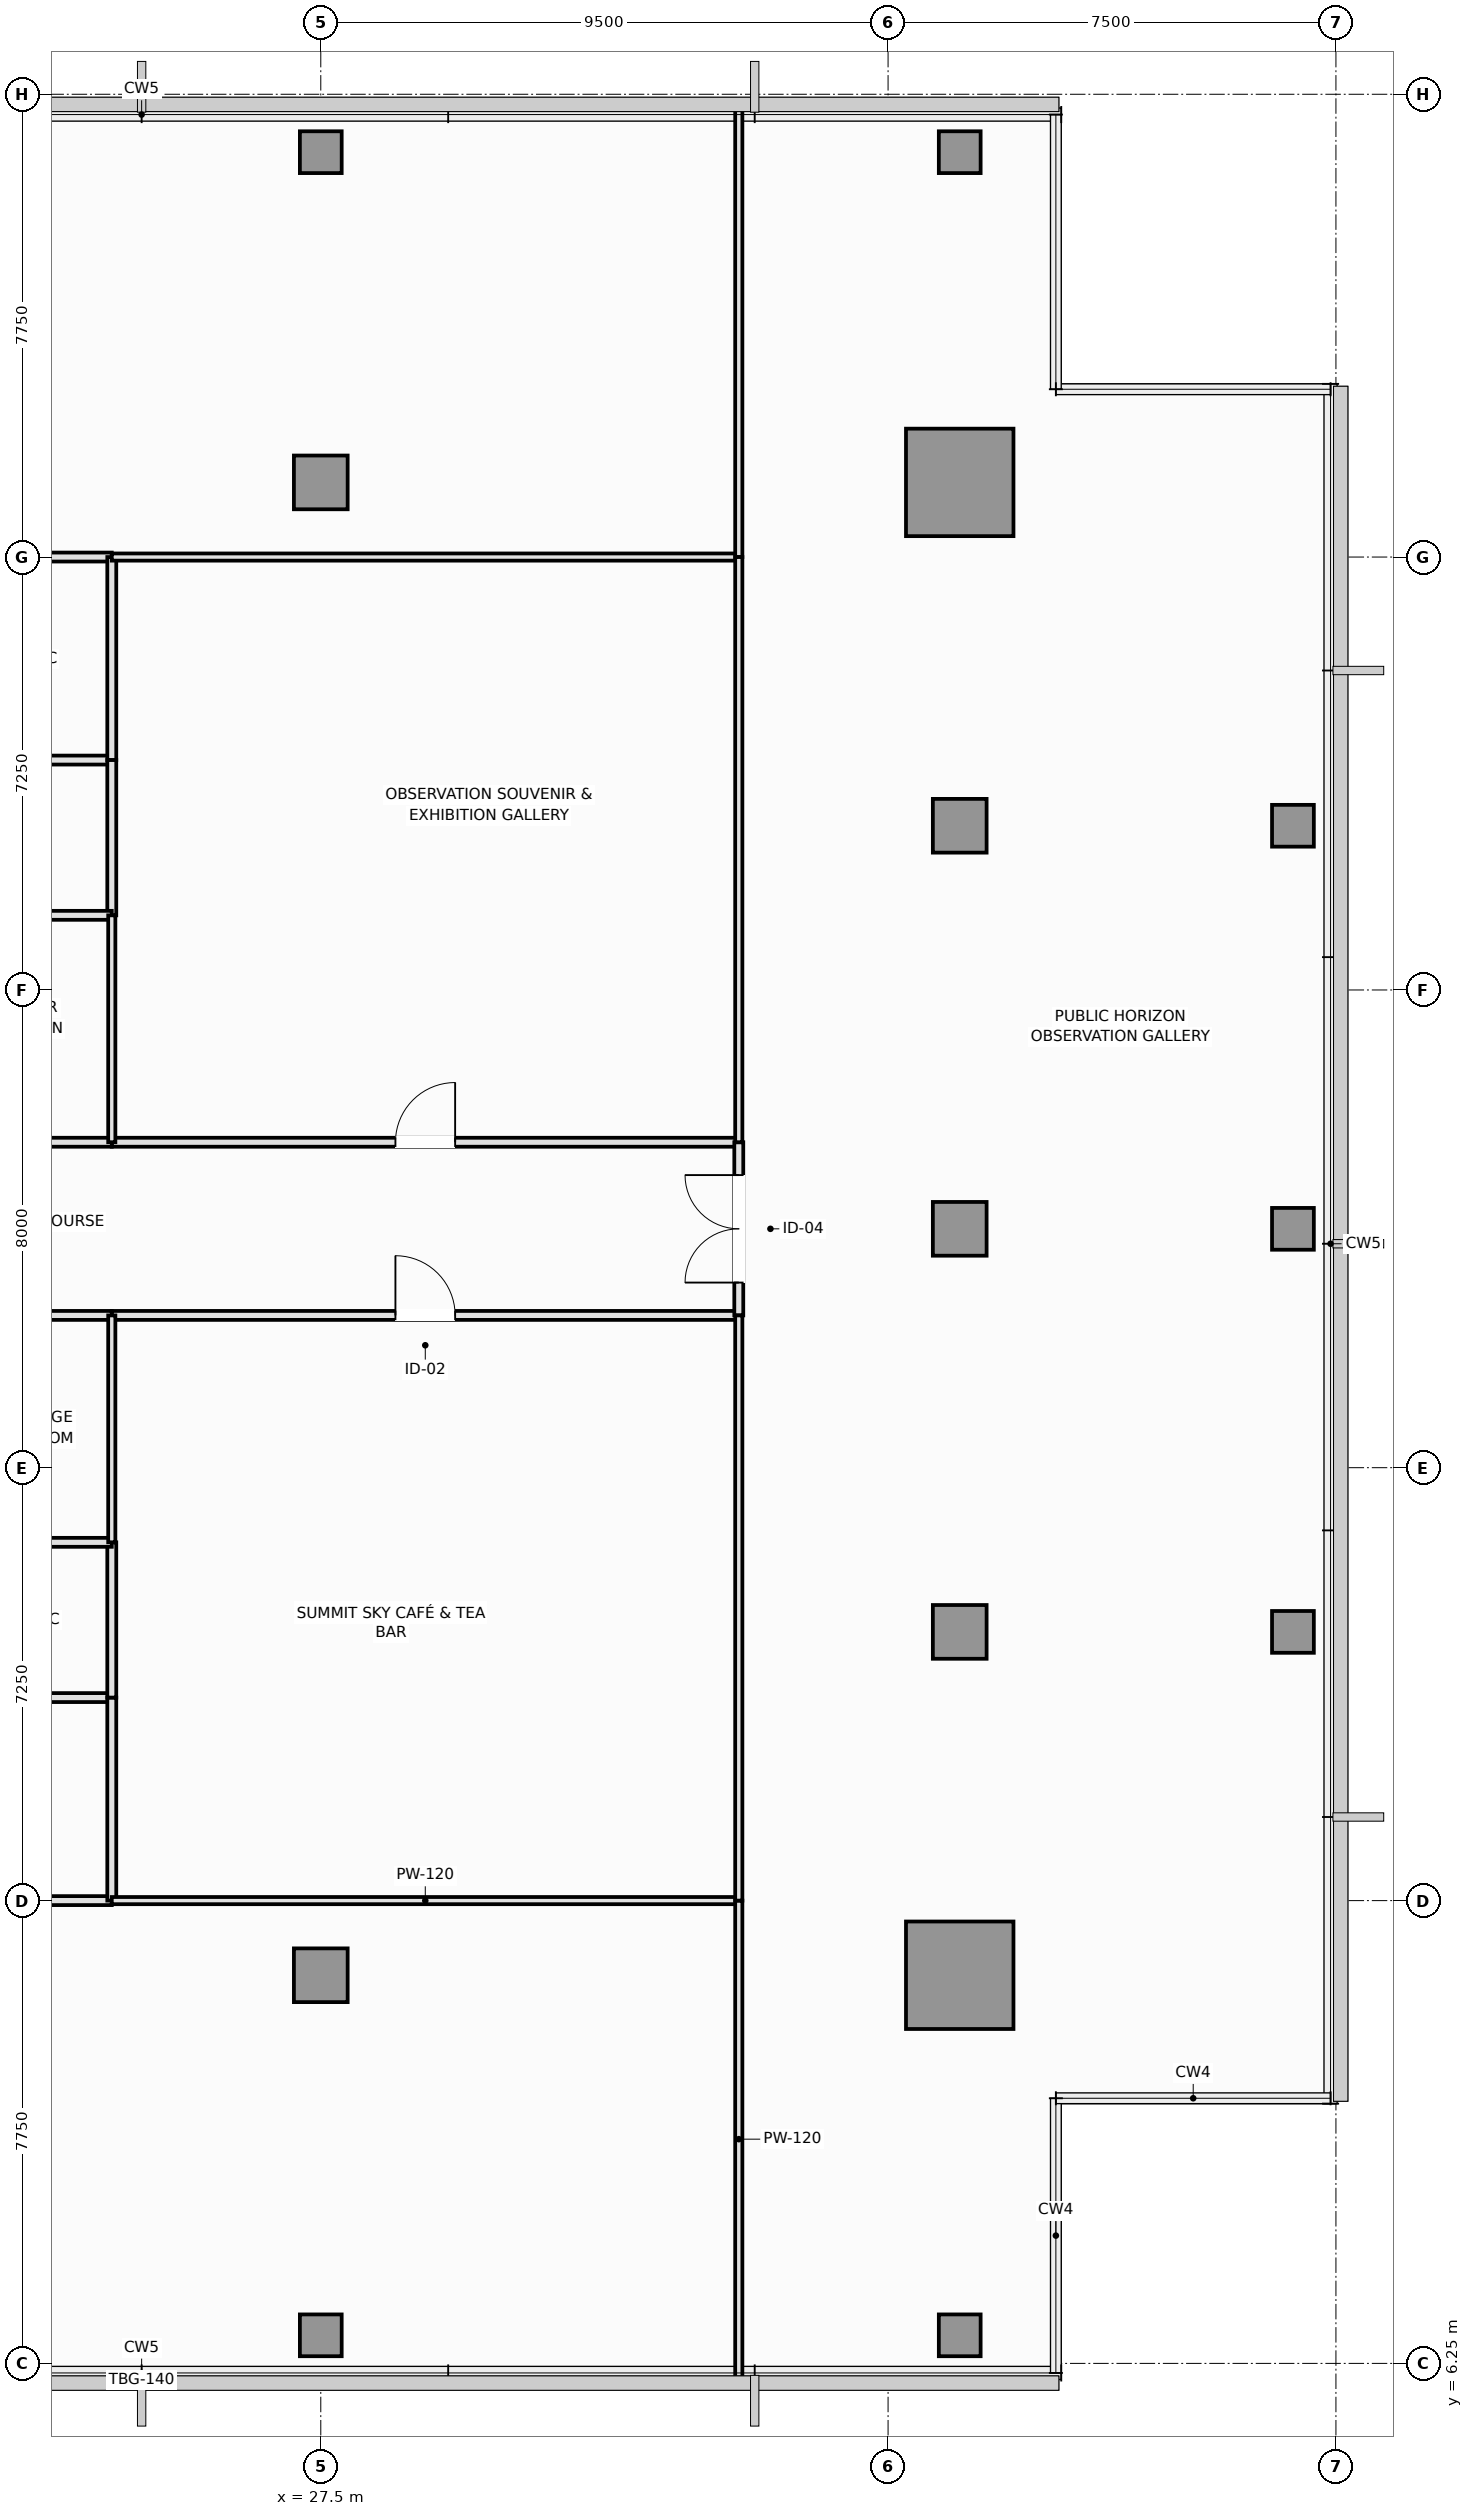
"""IFC4 building model, lengths in metres.
Left out: names, types, materials, properties, quantities, classifications, styles, units other than length and angle.
Written with IfcOpenShell. Run it as: python <this file> out.ifc"""

import sys

from ifc_helpers import new_model, si_unit, direction, frame, frame_2d, origin, origin_2d, place, context, subcontext, project, spatial, rectangle, extrude, element, fill, save


model = new_model("IFC4")
c1 = context("Model", 3, precision=1e-05, world=origin(), true_north=direction((0.0, 1.0)))
c2 = subcontext(c1, "Body", "Model", "MODEL_VIEW")
j1 = project(units=[si_unit("LENGTHUNIT", "METRE"), si_unit("PLANEANGLEUNIT", "RADIAN")], contexts=[c1])
p1 = place(None, origin())
s1 = spatial("IfcSite", under=j1, at=p1, CompositionType="ELEMENT")
p2 = place(p1, origin())
s2 = spatial("IfcBuilding", under=s1, at=p2, CompositionType="ELEMENT")
p3 = place(p2, frame((0.0, 0.0, 291.85)))
s3 = spatial("IfcBuildingStorey", under=s2, at=p3, CompositionType="ELEMENT", Elevation=291.85)
for number, where, z_axis, x_axis in (
    (1, (38.2, 12.75, 0.0), (0.0, 0.0, 1.0), (1.0, 0.0, 0.0)),
    (2, (38.2, 37.75, 0.0), (0.0, 0.0, 1.0), (1.0, 0.0, 0.0)),
):
    element("IfcColumn", number, at=place(p3, frame(where, z_axis=z_axis, x_axis=x_axis)), inside=s3, PredefinedType="COLUMN", context=c2, shape_type="SweptSolid", body=[
        extrude(rectangle(XDim=1.8, YDim=1.8, at=origin_2d()), origin(), (0.0, 0.0, 1.0), 4.8),
    ])
for number, where, z_axis, x_axis in (
    (3, (27.5, 12.75, 0.0), (0.0, 0.0, 1.0), (1.0, 0.0, 0.0)),
    (4, (27.5, 37.75, 0.0), (0.0, 0.0, 1.0), (1.0, 0.0, 0.0)),
    (5, (38.2, 18.5, 0.0), (0.0, 0.0, 1.0), (1.0, 0.0, 0.0)),
    (6, (38.2, 25.25, 0.0), (0.0, 0.0, 1.0), (1.0, 0.0, 0.0)),
    (7, (38.2, 32.0, 0.0), (0.0, 0.0, 1.0), (1.0, 0.0, 0.0)),
):
    element("IfcColumn", number, at=place(p3, frame(where, z_axis=z_axis, x_axis=x_axis)), inside=s3, PredefinedType="COLUMN", context=c2, shape_type="SweptSolid", body=[
        extrude(rectangle(XDim=0.9, YDim=0.9, at=origin_2d()), origin(), (0.0, 0.0, 1.0), 4.8),
    ])
for number, where, z_axis, x_axis in (
    (8, (43.78, 18.5, 0.0), (0.0, 0.0, 1.0), (1.0, 0.0, 0.0)),
    (9, (43.78, 25.25, 0.0), (0.0, 0.0, 1.0), (1.0, 0.0, 0.0)),
    (10, (43.78, 32.0, 0.0), (0.0, 0.0, 1.0), (1.0, 0.0, 0.0)),
    (11, (27.5, 6.72, 0.0), (0.0, 0.0, 1.0), (1.0, 0.0, 0.0)),
    (12, (38.2, 6.72, 0.0), (0.0, 0.0, 1.0), (1.0, 0.0, 0.0)),
    (13, (27.5, 43.28, 0.0), (0.0, 0.0, 1.0), (1.0, 0.0, 0.0)),
    (14, (38.2, 43.28, 0.0), (0.0, 0.0, 1.0), (1.0, 0.0, 0.0)),
):
    element("IfcColumn", number, at=place(p3, frame(where, z_axis=z_axis, x_axis=x_axis)), inside=s3, PredefinedType="COLUMN", context=c2, shape_type="SweptSolid", body=[
        extrude(rectangle(XDim=0.7, YDim=0.7, at=origin_2d()), origin(), (0.0, 0.0, 1.0), 4.8),
    ])
p4 = place(p3, frame((24.0, 23.8, 0.0), z_axis=(0.0, 0.0, 1.0), x_axis=(1.0, 0.0, 0.0)))
e15 = element("IfcWall", 15, at=p4, inside=s3, PredefinedType="PARTITIONING", context=c2, shape_type="SweptSolid", body=[
    extrude(rectangle(XDim=10.5, YDim=0.15, at=frame_2d((5.25, 0.0))), origin(), (0.0, 0.0, 1.0), 4.6),
])
p5 = place(p4, frame((4.75, 0.0, 0.0)))
e16 = element("IfcOpeningElement", 16, at=p5, cuts=e15, PredefinedType="OPENING", context=c2, shape_type="SweptSolid", body=[
    extrude(rectangle(XDim=1.0, YDim=2.15, at=frame_2d((0.5, 1.075))), frame((0.0, 0.085, 0.0), z_axis=(0.0, -1.0, 0.0), x_axis=(1.0, 0.0, 0.0)), (0.0, 0.0, 1.0), 0.17),
])
p6 = place(p3, frame((24.0, 26.7, 0.0), z_axis=(0.0, 0.0, 1.0), x_axis=(1.0, 0.0, 0.0)))
e17 = element("IfcWall", 17, at=p6, inside=s3, PredefinedType="PARTITIONING", context=c2, shape_type="SweptSolid", body=[
    extrude(rectangle(XDim=10.5, YDim=0.15, at=frame_2d((5.25, 0.0))), origin(), (0.0, 0.0, 1.0), 4.6),
])
p7 = place(p6, frame((4.75, 0.0, 0.0)))
e18 = element("IfcOpeningElement", 18, at=p7, cuts=e17, PredefinedType="OPENING", context=c2, shape_type="SweptSolid", body=[
    extrude(rectangle(XDim=1.0, YDim=2.15, at=frame_2d((0.5, 1.075))), frame((0.0, 0.085, 0.0), z_axis=(0.0, -1.0, 0.0), x_axis=(1.0, 0.0, 0.0)), (0.0, 0.0, 1.0), 0.17),
])
p8 = place(p3, frame((34.5, 23.8, 0.0), z_axis=(0.0, 0.0, 1.0), x_axis=(0.0, 1.0, 0.0)))
e19 = element("IfcWall", 19, at=p8, inside=s3, PredefinedType="PARTITIONING", context=c2, shape_type="SweptSolid", body=[
    extrude(rectangle(XDim=2.9, YDim=0.15, at=frame_2d((1.45, 0.0))), origin(), (0.0, 0.0, 1.0), 4.6),
])
p9 = place(p8, frame((0.55, 0.0, 0.0)))
e20 = element("IfcOpeningElement", 20, at=p9, cuts=e19, PredefinedType="OPENING", context=c2, shape_type="SweptSolid", body=[
    extrude(rectangle(XDim=1.8, YDim=2.2, at=frame_2d((0.9, 1.1))), frame((0.0, 0.085, 0.0), z_axis=(0.0, -1.0, 0.0), x_axis=(1.0, 0.0, 0.0)), (0.0, 0.0, 1.0), 0.17),
])
for number, where, z_axis, x_axis in (
    (21, (20.2, 23.8, 0.0), (0.0, 0.0, 1.0), (1.0, 0.0, 0.0)),
    (22, (20.2, 26.7, 0.0), (0.0, 0.0, 1.0), (1.0, 0.0, 0.0)),
):
    element("IfcWall", number, at=place(p3, frame(where, z_axis=z_axis, x_axis=x_axis)), inside=s3, PredefinedType="PARTITIONING", context=c2, shape_type="SweptSolid", body=[
        extrude(rectangle(XDim=3.8, YDim=0.15, at=frame_2d((1.9, 0.0))), origin(), (0.0, 0.0, 1.0), 4.6),
    ])
for number, where, z_axis, x_axis in (
    (23, (20.2, 17.4, 0.0), (0.0, 0.0, 1.0), (1.0, 0.0, 0.0)),
    (24, (20.2, 14.0, 0.0), (0.0, 0.0, 1.0), (1.0, 0.0, 0.0)),
):
    element("IfcWall", number, at=place(p3, frame(where, z_axis=z_axis, x_axis=x_axis)), inside=s3, PredefinedType="PLUMBINGWALL", context=c2, shape_type="SweptSolid", body=[
        extrude(rectangle(XDim=3.8, YDim=0.15, at=frame_2d((1.9, 0.0))), origin(), (0.0, 0.0, 1.0), 4.6),
    ])
p10 = place(p3, frame((24.0, 14.0, 0.0), z_axis=(0.0, 0.0, 1.0), x_axis=(0.0, 1.0, 0.0)))
e25 = element("IfcWall", 25, at=p10, inside=s3, PredefinedType="PLUMBINGWALL", context=c2, shape_type="SweptSolid", body=[
    extrude(rectangle(XDim=3.4, YDim=0.15, at=frame_2d((1.7, 0.0))), origin(), (0.0, 0.0, 1.0), 4.15),
])
for number, where, z_axis, x_axis in (
    (26, (20.2, 33.1, 0.0), (0.0, 0.0, 1.0), (1.0, 0.0, 0.0)),
    (27, (20.2, 36.5, 0.0), (0.0, 0.0, 1.0), (1.0, 0.0, 0.0)),
):
    element("IfcWall", number, at=place(p3, frame(where, z_axis=z_axis, x_axis=x_axis)), inside=s3, PredefinedType="PLUMBINGWALL", context=c2, shape_type="SweptSolid", body=[
        extrude(rectangle(XDim=3.8, YDim=0.15, at=frame_2d((1.9, 0.0))), origin(), (0.0, 0.0, 1.0), 4.6),
    ])
p11 = place(p3, frame((24.0, 33.1, 0.0), z_axis=(0.0, 0.0, 1.0), x_axis=(0.0, 1.0, 0.0)))
e28 = element("IfcWall", 28, at=p11, inside=s3, PredefinedType="PLUMBINGWALL", context=c2, shape_type="SweptSolid", body=[
    extrude(rectangle(XDim=3.4, YDim=0.15, at=frame_2d((1.7, 0.0))), origin(), (0.0, 0.0, 1.0), 4.15),
])
p12 = place(p3, frame((24.0, 17.4, 0.0), z_axis=(0.0, 0.0, 1.0), x_axis=(0.0, 1.0, 0.0)))
e29 = element("IfcWall", 29, at=p12, inside=s3, PredefinedType="PLUMBINGWALL", context=c2, shape_type="SweptSolid", body=[
    extrude(rectangle(XDim=2.6, YDim=0.15, at=frame_2d((1.3, 0.0))), origin(), (0.0, 0.0, 1.0), 4.15),
])
p13 = place(p3, frame((20.2, 20.0, 0.0), z_axis=(0.0, 0.0, 1.0), x_axis=(1.0, 0.0, 0.0)))
e30 = element("IfcWall", 30, at=p13, inside=s3, PredefinedType="PLUMBINGWALL", context=c2, shape_type="SweptSolid", body=[
    extrude(rectangle(XDim=3.8, YDim=0.15, at=frame_2d((1.9, 0.0))), origin(), (0.0, 0.0, 1.0), 4.6),
])
p14 = place(p3, frame((24.0, 30.5, 0.0), z_axis=(0.0, 0.0, 1.0), x_axis=(0.0, 1.0, 0.0)))
e31 = element("IfcWall", 31, at=p14, inside=s3, PredefinedType="PLUMBINGWALL", context=c2, shape_type="SweptSolid", body=[
    extrude(rectangle(XDim=2.6, YDim=0.15, at=frame_2d((1.3, 0.0))), origin(), (0.0, 0.0, 1.0), 4.15),
])
p15 = place(p3, frame((20.2, 30.5, 0.0), z_axis=(0.0, 0.0, 1.0), x_axis=(1.0, 0.0, 0.0)))
e32 = element("IfcWall", 32, at=p15, inside=s3, PredefinedType="PLUMBINGWALL", context=c2, shape_type="SweptSolid", body=[
    extrude(rectangle(XDim=3.8, YDim=0.15, at=frame_2d((1.9, 0.0))), origin(), (0.0, 0.0, 1.0), 4.6),
])
p16 = place(p3, frame((24.0, 14.0, 0.0), z_axis=(0.0, 0.0, 1.0), x_axis=(1.0, 0.0, 0.0)))
e33 = element("IfcWall", 33, at=p16, inside=s3, PredefinedType="PARTITIONING", context=c2, shape_type="SweptSolid", body=[
    extrude(rectangle(XDim=10.5, YDim=0.12, at=frame_2d((5.25, 0.0))), origin(), (0.0, 0.0, 1.0), 4.6),
])
p17 = place(p3, frame((34.5, 6.01, 0.0), z_axis=(0.0, 0.0, 1.0), x_axis=(0.0, 1.0, 0.0)))
e34 = element("IfcWall", 34, at=p17, inside=s3, PredefinedType="PARTITIONING", context=c2, shape_type="SweptSolid", body=[
    extrude(rectangle(XDim=7.99, YDim=0.12, at=frame_2d((3.995, 0.0))), origin(), (0.0, 0.0, 1.0), 4.15),
])
p18 = place(p3, frame((24.0, 36.5, 0.0), z_axis=(0.0, 0.0, 1.0), x_axis=(1.0, 0.0, 0.0)))
e35 = element("IfcWall", 35, at=p18, inside=s3, PredefinedType="PARTITIONING", context=c2, shape_type="SweptSolid", body=[
    extrude(rectangle(XDim=10.5, YDim=0.12, at=frame_2d((5.25, 0.0))), origin(), (0.0, 0.0, 1.0), 4.6),
])
p19 = place(p3, frame((34.5, 36.5, 0.0), z_axis=(0.0, 0.0, 1.0), x_axis=(0.0, 1.0, 0.0)))
e36 = element("IfcWall", 36, at=p19, inside=s3, PredefinedType="PARTITIONING", context=c2, shape_type="SweptSolid", body=[
    extrude(rectangle(XDim=7.49, YDim=0.12, at=frame_2d((3.745, 0.0))), origin(), (0.0, 0.0, 1.0), 4.15),
])
p20 = place(p3, frame((34.5, 14.0, 0.0), z_axis=(0.0, 0.0, 1.0), x_axis=(0.0, 1.0, 0.0)))
e37 = element("IfcWall", 37, at=p20, inside=s3, PredefinedType="PARTITIONING", context=c2, shape_type="SweptSolid", body=[
    extrude(rectangle(XDim=9.8, YDim=0.12, at=frame_2d((4.9, 0.0))), origin(), (0.0, 0.0, 1.0), 4.6),
])
p21 = place(p3, frame((24.0, 20.0, 0.0), z_axis=(0.0, 0.0, 1.0), x_axis=(0.0, 1.0, 0.0)))
e38 = element("IfcWall", 38, at=p21, inside=s3, PredefinedType="PARTITIONING", context=c2, shape_type="SweptSolid", body=[
    extrude(rectangle(XDim=3.8, YDim=0.12, at=frame_2d((1.9, 0.0))), origin(), (0.0, 0.0, 1.0), 4.15),
])
p22 = place(p3, frame((34.5, 26.7, 0.0), z_axis=(0.0, 0.0, 1.0), x_axis=(0.0, 1.0, 0.0)))
e39 = element("IfcWall", 39, at=p22, inside=s3, PredefinedType="PARTITIONING", context=c2, shape_type="SweptSolid", body=[
    extrude(rectangle(XDim=9.8, YDim=0.12, at=frame_2d((4.9, 0.0))), origin(), (0.0, 0.0, 1.0), 4.6),
])
p23 = place(p3, frame((24.0, 26.7, 0.0), z_axis=(0.0, 0.0, 1.0), x_axis=(0.0, 1.0, 0.0)))
e40 = element("IfcWall", 40, at=p23, inside=s3, PredefinedType="PARTITIONING", context=c2, shape_type="SweptSolid", body=[
    extrude(rectangle(XDim=3.8, YDim=0.12, at=frame_2d((1.9, 0.0))), origin(), (0.0, 0.0, 1.0), 4.15),
])
p24 = place(p5, origin())
e41 = element("IfcDoor", 41, at=p24, inside=s3, OperationType="SINGLE_SWING_LEFT", PredefinedType="DOOR", context=c2, shape_type="SweptSolid", body=[
    extrude(rectangle(XDim=1.0, YDim=2.15, at=frame_2d((0.5, 1.075))), frame((0.0, 0.025, 0.0), z_axis=(0.0, -1.0, 0.0), x_axis=(1.0, 0.0, 0.0)), (0.0, 0.0, 1.0), 0.05),
])
fill(e16, e41)
p25 = place(p7, origin())
e42 = element("IfcDoor", 42, at=p25, inside=s3, OperationType="SINGLE_SWING_RIGHT", PredefinedType="DOOR", context=c2, shape_type="SweptSolid", body=[
    extrude(rectangle(XDim=1.0, YDim=2.15, at=frame_2d((0.5, 1.075))), frame((0.0, 0.025, 0.0), z_axis=(0.0, -1.0, 0.0), x_axis=(1.0, 0.0, 0.0)), (0.0, 0.0, 1.0), 0.05),
])
fill(e18, e42)
p26 = place(p9, origin())
e43 = element("IfcDoor", 43, at=p26, inside=s3, OperationType="DOUBLE_DOOR_SINGLE_SWING", PredefinedType="DOOR", context=c2, shape_type="SweptSolid", body=[
    extrude(rectangle(XDim=1.8, YDim=2.2, at=frame_2d((0.9, 1.1))), frame((0.0, 0.025, 0.0), z_axis=(0.0, -1.0, 0.0), x_axis=(1.0, 0.0, 0.0)), (0.0, 0.0, 1.0), 0.05),
])
fill(e20, e43)
save(model, sys.argv[1])
